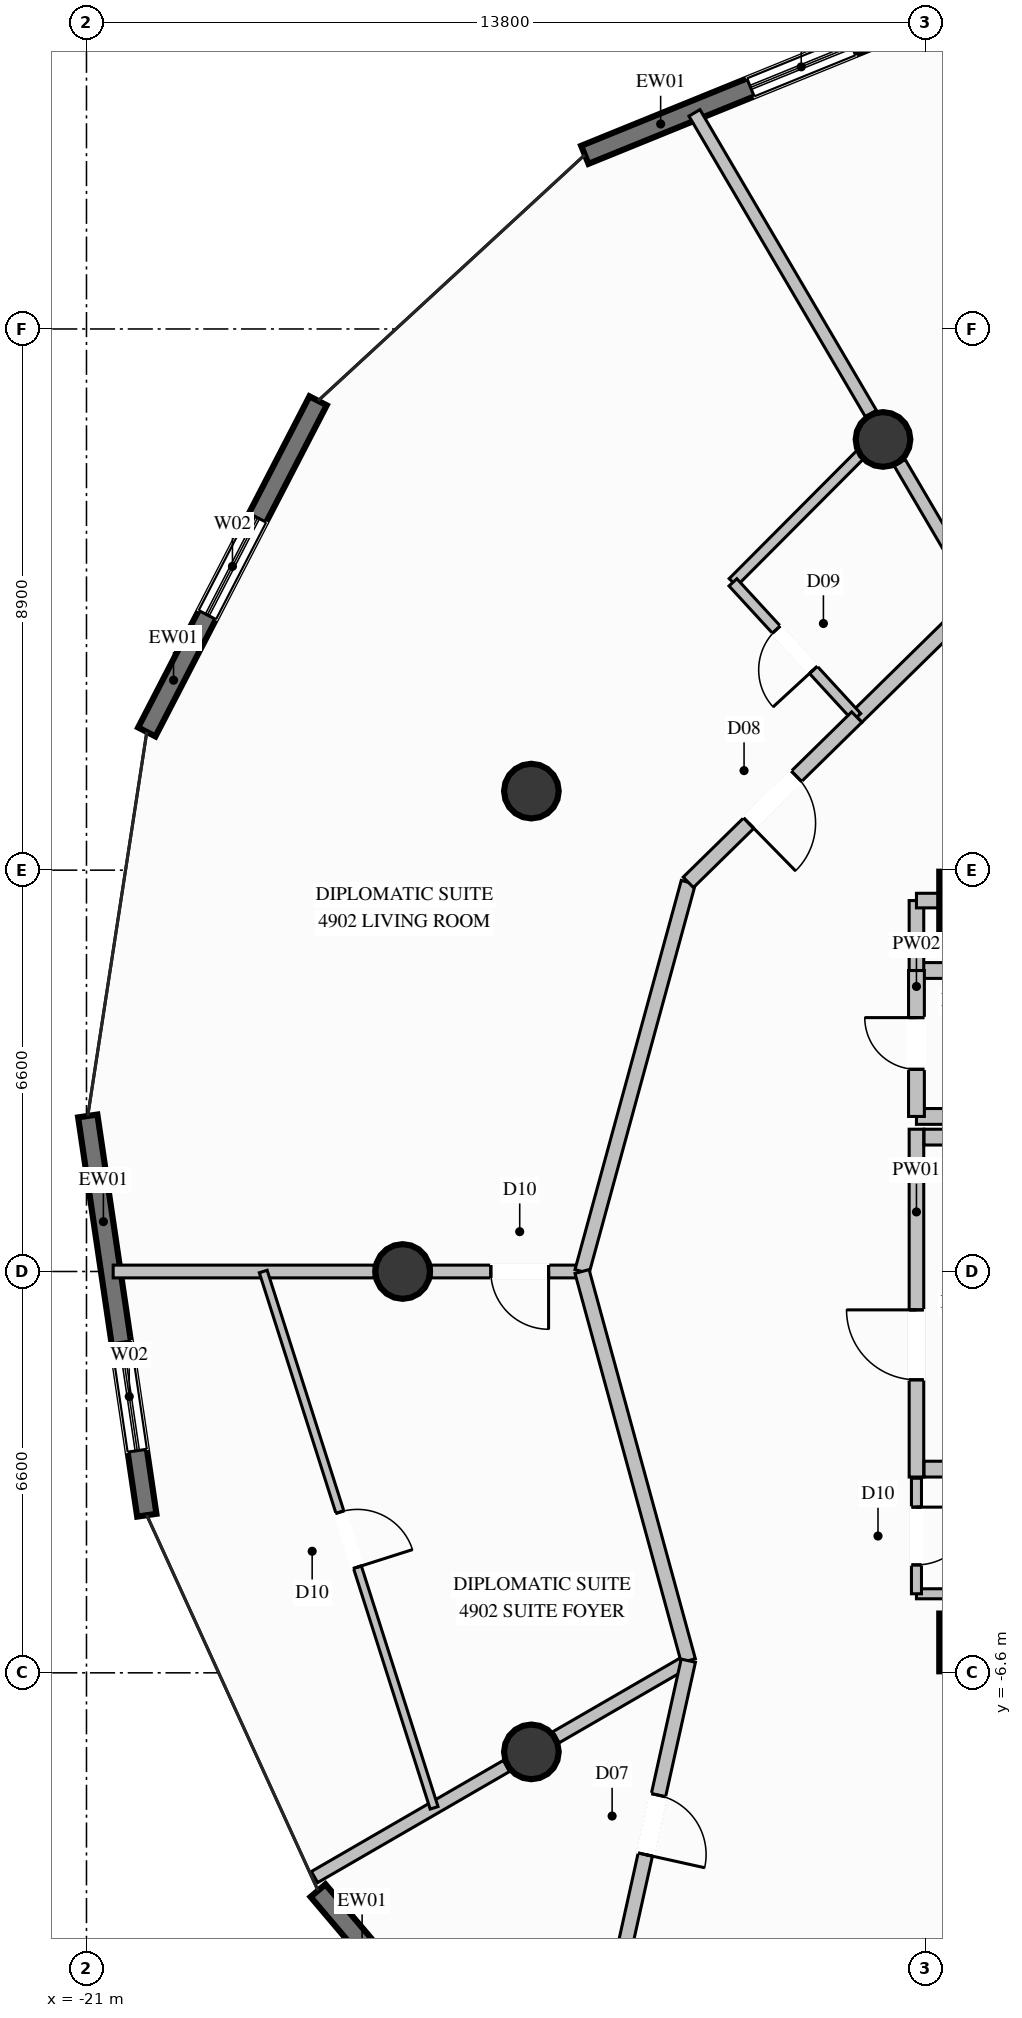
"""IFC4 building model, lengths in metres.
Left out: names, types, materials, properties, quantities, classifications, styles, units other than length and angle.
Written with IfcOpenShell. Run it as: python <this file> out.ifc"""

import sys

from ifc_helpers import new_model, si_unit, direction, frame, frame_2d, origin, origin_2d, place, context, subcontext, project, spatial, rectangle, circle, extrude, element, fill, save


model = new_model("IFC4")
c1 = context("Model", 3, precision=1e-05, world=origin(), true_north=direction((0.0, 1.0)))
c2 = subcontext(c1, "Body", "Model", "MODEL_VIEW")
j1 = project(units=[si_unit("LENGTHUNIT", "METRE"), si_unit("PLANEANGLEUNIT", "RADIAN")], contexts=[c1])
p1 = place(None, origin())
s1 = spatial("IfcSite", under=j1, at=p1, CompositionType="ELEMENT")
p2 = place(p1, origin())
s2 = spatial("IfcBuilding", under=s1, at=p2, CompositionType="ELEMENT")
p3 = place(p2, frame((0.0, 0.0, 184.0)))
s3 = spatial("IfcBuildingStorey", under=s2, at=p3, CompositionType="ELEMENT", Elevation=184.0)
for number, where, z_axis, x_axis in (
    (1, (-6.5, -6.1, 0.0), (0.0, 0.0, 1.0), (1.0, 0.0, 0.0)),
    (2, (-6.5, 6.1, 0.0), (0.0, 0.0, 1.0), (1.0, 0.0, 0.0)),
):
    element("IfcColumn", number, at=place(p3, frame(where, z_axis=z_axis, x_axis=x_axis)), inside=s3, PredefinedType="COLUMN", context=c2, shape_type="SweptSolid", body=[
        extrude(rectangle(XDim=0.95, YDim=0.95, at=origin_2d()), origin(), (0.0, 0.0, 1.0), 3.6),
    ])
for number, where, z_axis, x_axis in (
    (3, (-7.9, 13.683, 0.0), (0.0, 0.0, 1.0), (1.0, 0.0, 0.0)),
    (4, (-13.683, 7.9, 0.0), (0.0, 0.0, 1.0), (1.0, 0.0, 0.0)),
    (5, (-15.8, 0.0, 0.0), (0.0, 0.0, 1.0), (1.0, 0.0, 0.0)),
    (6, (-13.683, -7.9, 0.0), (0.0, 0.0, 1.0), (1.0, 0.0, 0.0)),
):
    element("IfcColumn", number, at=place(p3, frame(where, z_axis=z_axis, x_axis=x_axis)), inside=s3, PredefinedType="COLUMN", context=c2, shape_type="SweptSolid", body=[
        extrude(circle(Radius=0.45, at=origin_2d()), origin(), (0.0, 0.0, 1.0), 3.6),
    ])
p4 = place(p3, frame((-12.804, 18.364, 0.0), z_axis=(0.0, 0.0, 1.0), x_axis=(0.926362198949, 0.376633875745, 0.0)))
e7 = element("IfcWall", 7, at=p4, inside=s3, PredefinedType="SOLIDWALL", context=c2, shape_type="SweptSolid", body=[
    extrude(rectangle(XDim=5.966, YDim=0.32, at=frame_2d((2.983, 0.0))), origin(), (0.0, 0.0, 1.0), 3.36),
])
p5 = place(p4, frame((2.942, 0.0, 0.35)))
e8 = element("IfcOpeningElement", 8, at=p5, cuts=e7, PredefinedType="OPENING", context=c2, shape_type="SweptSolid", body=[
    extrude(rectangle(XDim=1.8, YDim=2.6, at=frame_2d((0.9, 1.3))), frame((0.0, 0.17, 0.0), z_axis=(0.0, -1.0, 0.0), x_axis=(1.0, 0.0, 0.0)), (0.0, 0.0, 1.0), 0.34),
])
p6 = place(p3, frame((-20.008, 8.873, 0.0), z_axis=(0.0, 0.0, 1.0), x_axis=(0.459451082053, 0.888203075428, 0.0)))
e9 = element("IfcWall", 9, at=p6, inside=s3, PredefinedType="SOLIDWALL", context=c2, shape_type="SweptSolid", body=[
    extrude(rectangle(XDim=6.132, YDim=0.32, at=frame_2d((3.066, 0.0))), origin(), (0.0, 0.0, 1.0), 3.36),
])
p7 = place(p6, frame((2.166, 0.0, 0.35)))
e10 = element("IfcOpeningElement", 10, at=p7, cuts=e9, PredefinedType="OPENING", context=c2, shape_type="SweptSolid", body=[
    extrude(rectangle(XDim=1.8, YDim=2.6, at=frame_2d((0.9, 1.3))), frame((0.0, 0.17, 0.0), z_axis=(0.0, -1.0, 0.0), x_axis=(1.0, 0.0, 0.0)), (0.0, 0.0, 1.0), 0.34),
])
p8 = place(p3, frame((-20.008, -4.008, 0.0), z_axis=(0.0, 0.0, 1.0), x_axis=(-0.146280717265, 0.989243120652, 0.0)))
e11 = element("IfcWall", 11, at=p8, inside=s3, PredefinedType="SOLIDWALL", context=c2, shape_type="SweptSolid", body=[
    extrude(rectangle(XDim=6.637, YDim=0.32, at=frame_2d((3.319, 0.0))), origin(), (0.0, 0.0, 1.0), 3.36),
])
p9 = place(p8, frame((1.073, 0.0, 0.35)))
e12 = element("IfcOpeningElement", 12, at=p9, cuts=e11, PredefinedType="OPENING", context=c2, shape_type="SweptSolid", body=[
    extrude(rectangle(XDim=1.8, YDim=2.6, at=frame_2d((0.9, 1.3))), frame((0.0, 0.17, 0.0), z_axis=(0.0, -1.0, 0.0), x_axis=(1.0, 0.0, 0.0)), (0.0, 0.0, 1.0), 0.34),
])
p10 = place(p3, frame((-12.806, -15.357, 0.0), z_axis=(0.0, 0.0, 1.0), x_axis=(-0.646480871515, 0.762930195212, 0.0)))
e13 = element("IfcWall", 13, at=p10, inside=s3, PredefinedType="SOLIDWALL", context=c2, shape_type="SweptSolid", body=[
    extrude(rectangle(XDim=6.784, YDim=0.32, at=frame_2d((3.392, 0.0))), origin(), (0.0, 0.0, 1.0), 3.36),
])
p11 = place(p10, frame((2.492, 0.0, 0.35)))
e14 = element("IfcOpeningElement", 14, at=p11, cuts=e13, PredefinedType="OPENING", context=c2, shape_type="SweptSolid", body=[
    extrude(rectangle(XDim=1.8, YDim=2.6, at=frame_2d((0.9, 1.3))), frame((0.0, 0.17, 0.0), z_axis=(0.0, -1.0, 0.0), x_axis=(1.0, 0.0, 0.0)), (0.0, 0.0, 1.0), 0.34),
])
p12 = place(p3, frame((-7.35, -3.38, 0.0), z_axis=(0.0, 0.0, 1.0), x_axis=(0.0, 1.0, 0.0)))
e15 = element("IfcWall", 15, at=p12, inside=s3, PredefinedType="PARTITIONING", context=c2, shape_type="SweptSolid", body=[
    extrude(rectangle(XDim=5.72, YDim=0.24, at=frame_2d((2.86, 0.0))), origin(), (0.0, 0.0, 1.0), 2.445),
])
p13 = place(p12, frame((1.599, 0.0, 0.0)))
e16 = element("IfcOpeningElement", 16, at=p13, cuts=e15, PredefinedType="OPENING", context=c2, shape_type="SweptSolid", body=[
    extrude(rectangle(XDim=1.15, YDim=2.2, at=frame_2d((0.575, 1.1))), frame((0.0, 0.13, 0.0), z_axis=(0.0, -1.0, 0.0), x_axis=(1.0, 0.0, 0.0)), (0.0, 0.0, 1.0), 0.26),
])
p14 = place(p3, frame((-7.225, -3.25, 0.0), z_axis=(0.0, 0.0, 1.0), x_axis=(1.0, 0.0, 0.0)))
e17 = element("IfcWall", 17, at=p14, inside=s3, PredefinedType="PARTITIONING", context=c2, shape_type="SweptSolid", body=[
    extrude(rectangle(XDim=3.095, YDim=0.26, at=frame_2d((1.548, 0.0))), origin(), (0.0, 0.0, 1.0), 3.36),
])
p15 = place(p3, frame((-7.225, 2.21, 0.0), z_axis=(0.0, 0.0, 1.0), x_axis=(1.0, 0.0, 0.0)))
e18 = element("IfcWall", 18, at=p15, inside=s3, PredefinedType="PARTITIONING", context=c2, shape_type="SweptSolid", body=[
    extrude(rectangle(XDim=0.875, YDim=0.26, at=frame_2d((0.438, 0.0))), origin(), (0.0, 0.0, 1.0), 3.36),
])
for number, where, z_axis, x_axis in (
    (19, (-7.35, 4.95, 0.0), (0.0, 0.0, 1.0), (1.0, 0.0, 0.0)),
    (20, (-7.35, 2.55, 0.0), (0.0, 0.0, 1.0), (1.0, 0.0, 0.0)),
):
    element("IfcWall", number, at=place(p3, frame(where, z_axis=z_axis, x_axis=x_axis)), inside=s3, PredefinedType="PARTITIONING", context=c2, shape_type="SweptSolid", body=[
        extrude(rectangle(XDim=0.93, YDim=0.26, at=frame_2d((0.465, 0.0))), origin(), (0.0, 0.0, 1.0), 3.36),
    ])
p16 = place(p3, frame((-7.35, 2.55, 0.0), z_axis=(0.0, 0.0, 1.0), x_axis=(0.0, 1.0, 0.0)))
e21 = element("IfcWall", 21, at=p16, inside=s3, PredefinedType="PARTITIONING", context=c2, shape_type="SweptSolid", body=[
    extrude(rectangle(XDim=2.4, YDim=0.26, at=frame_2d((1.2, 0.0))), origin(), (0.0, 0.0, 1.0), 2.445),
])
p17 = place(p16, frame((0.775, 0.0, 0.0)))
e22 = element("IfcOpeningElement", 22, at=p17, cuts=e21, PredefinedType="OPENING", context=c2, shape_type="SweptSolid", body=[
    extrude(rectangle(XDim=0.85, YDim=2.05, at=frame_2d((0.425, 1.025))), frame((0.0, 0.14, 0.0), z_axis=(0.0, -1.0, 0.0), x_axis=(1.0, 0.0, 0.0)), (0.0, 0.0, 1.0), 0.28),
])
p18 = place(p3, frame((-7.35, 4.95, 0.0), z_axis=(0.0, 0.0, 1.0), x_axis=(0.0, 1.0, 0.0)))
e23 = element("IfcWall", 23, at=p18, inside=s3, PredefinedType="PARTITIONING", context=c2, shape_type="SweptSolid", body=[
    extrude(rectangle(XDim=1.15, YDim=0.24, at=frame_2d((0.575, 0.0))), origin(), (0.0, 0.0, 1.0), 2.445),
])
p19 = place(p3, frame((-7.35, 6.1, 0.0), z_axis=(0.0, 0.0, 1.0), x_axis=(1.0, 0.0, 0.0)))
e24 = element("IfcWall", 24, at=p19, inside=s3, PredefinedType="PARTITIONING", context=c2, shape_type="SweptSolid", body=[
    extrude(rectangle(XDim=0.85, YDim=0.24, at=frame_2d((0.425, 0.0))), origin(), (0.0, 0.0, 1.0), 2.877),
])
p20 = place(p3, frame((-7.35, -5.3, 0.0), z_axis=(0.0, 0.0, 1.0), x_axis=(1.0, 0.0, 0.0)))
e25 = element("IfcWall", 25, at=p20, inside=s3, PredefinedType="PARTITIONING", context=c2, shape_type="SweptSolid", body=[
    extrude(rectangle(XDim=1.5, YDim=0.165, at=frame_2d((0.75, 0.0))), origin(), (0.0, 0.0, 1.0), 2.445),
])
p21 = place(p3, frame((-7.35, -3.4, 0.0), z_axis=(0.0, 0.0, 1.0), x_axis=(0.0, -1.0, 0.0)))
e26 = element("IfcWall", 26, at=p21, inside=s3, PredefinedType="PARTITIONING", context=c2, shape_type="SweptSolid", body=[
    extrude(rectangle(XDim=1.9, YDim=0.165, at=frame_2d((0.95, 0.0))), origin(), (0.0, 0.0, 1.0), 3.36),
])
p22 = place(p21, frame((0.475, 0.0, 0.0)))
e27 = element("IfcOpeningElement", 27, at=p22, cuts=e26, PredefinedType="OPENING", context=c2, shape_type="SweptSolid", body=[
    extrude(rectangle(XDim=0.95, YDim=2.1, at=frame_2d((0.475, 1.05))), frame((0.0, 0.093, 0.0), z_axis=(0.0, -1.0, 0.0), x_axis=(1.0, 0.0, 0.0)), (0.0, 0.0, 1.0), 0.185),
])
p23 = place(p3, frame((-6.325, 11.085, 0.0), z_axis=(0.0, 0.0, 1.0), x_axis=(-0.506285052897, 0.862366189744, 0.0)))
e28 = element("IfcWall", 28, at=p23, inside=s3, PredefinedType="PARTITIONING", context=c2, shape_type="SweptSolid", body=[
    extrude(rectangle(XDim=2.57, YDim=0.21, at=frame_2d((1.285, 0.0))), origin(), (0.0, 0.0, 1.0), 2.877),
])
p24 = place(p3, frame((-8.099, 14.109, 0.0), z_axis=(0.0, 0.0, 1.0), x_axis=(-0.506111753197, 0.862467908548, 0.0)))
e29 = element("IfcWall", 29, at=p24, inside=s3, PredefinedType="PARTITIONING", context=c2, shape_type="SweptSolid", body=[
    extrude(rectangle(XDim=5.734, YDim=0.21, at=frame_2d((2.867, 0.0))), origin(), (0.0, 0.0, 1.0), 3.36),
])
p25 = place(p3, frame((-12.85, 0.0, 0.0), z_axis=(0.0, 0.0, 1.0), x_axis=(-1.0, 0.0, 0.0)))
e30 = element("IfcWall", 30, at=p25, inside=s3, PredefinedType="PARTITIONING", context=c2, shape_type="SweptSolid", body=[
    extrude(rectangle(XDim=2.48, YDim=0.21, at=frame_2d((1.24, 0.0))), origin(), (0.0, 0.0, 1.0), 3.36),
])
p26 = place(p25, frame((0.55, 0.0, 0.0)))
e31 = element("IfcOpeningElement", 31, at=p26, cuts=e30, PredefinedType="OPENING", context=c2, shape_type="SweptSolid", body=[
    extrude(rectangle(XDim=0.95, YDim=2.1, at=frame_2d((0.475, 1.05))), frame((0.0, 0.115, 0.0), z_axis=(0.0, -1.0, 0.0), x_axis=(1.0, 0.0, 0.0)), (0.0, 0.0, 1.0), 0.23),
])
p27 = place(p3, frame((-16.27, 0.0, 0.0), z_axis=(0.0, 0.0, 1.0), x_axis=(-1.0, 0.0, 0.0)))
e32 = element("IfcWall", 32, at=p27, inside=s3, PredefinedType="PARTITIONING", context=c2, shape_type="SweptSolid", body=[
    extrude(rectangle(XDim=4.291, YDim=0.21, at=frame_2d((2.146, 0.0))), origin(), (0.0, 0.0, 1.0), 3.36),
])
p28 = place(p3, frame((-11.102, -6.4, 0.0), z_axis=(0.0, 0.0, 1.0), x_axis=(-0.8654883009, -0.500929137708, 0.0)))
e33 = element("IfcWall", 33, at=p28, inside=s3, PredefinedType="PARTITIONING", context=c2, shape_type="SweptSolid", body=[
    extrude(rectangle(XDim=2.515, YDim=0.21, at=frame_2d((1.258, 0.0))), origin(), (0.0, 0.0, 1.0), 2.877),
])
p29 = place(p3, frame((-14.092, -8.131, 0.0), z_axis=(0.0, 0.0, 1.0), x_axis=(-0.865475144778, -0.50095186772, 0.0)))
e34 = element("IfcWall", 34, at=p29, inside=s3, PredefinedType="PARTITIONING", context=c2, shape_type="SweptSolid", body=[
    extrude(rectangle(XDim=3.649, YDim=0.21, at=frame_2d((1.824, 0.0))), origin(), (0.0, 0.0, 1.0), 3.36),
])
p30 = place(p3, frame((-6.325, 11.085, 0.0), z_axis=(0.0, 0.0, 1.0), x_axis=(-0.713850549357, -0.700298074524, 0.0)))
e35 = element("IfcWall", 35, at=p30, inside=s3, PredefinedType="PARTITIONING", context=c2, shape_type="SweptSolid", body=[
    extrude(rectangle(XDim=2.81, YDim=0.24, at=frame_2d((1.405, 0.0))), origin(), (0.0, 0.0, 1.0), 3.36),
])
p31 = place(p3, frame((-7.915, 13.794, 0.0), z_axis=(0.0, 0.0, 1.0), x_axis=(-0.70594646808, -0.708265193416, 0.0)))
e36 = element("IfcWall", 36, at=p31, inside=s3, PredefinedType="PLUMBINGWALL", context=c2, shape_type="SweptSolid", body=[
    extrude(rectangle(XDim=3.475, YDim=0.175, at=frame_2d((1.737, 0.0))), origin(), (0.0, 0.0, 1.0), 2.929),
])
p32 = place(p3, frame((-8.331, 9.117, 0.0), z_axis=(0.0, 0.0, 1.0), x_axis=(-0.676712049705, 0.736247785589, 0.0)))
e37 = element("IfcWall", 37, at=p32, inside=s3, PredefinedType="PLUMBINGWALL", context=c2, shape_type="SweptSolid", body=[
    extrude(rectangle(XDim=3.01, YDim=0.175, at=frame_2d((1.505, 0.0))), origin(), (0.0, 0.0, 1.0), 3.36),
])
p33 = place(p32, frame((1.055, 0.0, 0.0)))
e38 = element("IfcOpeningElement", 38, at=p33, cuts=e37, PredefinedType="OPENING", context=c2, shape_type="SweptSolid", body=[
    extrude(rectangle(XDim=0.9, YDim=2.1, at=frame_2d((0.45, 1.05))), frame((0.0, 0.098, 0.0), z_axis=(0.0, -1.0, 0.0), x_axis=(1.0, 0.0, 0.0)), (0.0, 0.0, 1.0), 0.195),
])
p34 = place(p3, frame((-11.102, 6.4, 0.0), z_axis=(0.0, 0.0, 1.0), x_axis=(-0.263484816116, -0.96466354325, 0.0)))
e39 = element("IfcWall", 39, at=p34, inside=s3, PredefinedType="PARTITIONING", context=c2, shape_type="SweptSolid", body=[
    extrude(rectangle(XDim=6.634, YDim=0.24, at=frame_2d((3.317, 0.0))), origin(), (0.0, 0.0, 1.0), 3.36),
])
p35 = place(p3, frame((-8.331, 9.117, 0.0), z_axis=(0.0, 0.0, 1.0), x_axis=(-0.714024122855, -0.700121098084, 0.0)))
e40 = element("IfcWall", 40, at=p35, inside=s3, PredefinedType="PARTITIONING", context=c2, shape_type="SweptSolid", body=[
    extrude(rectangle(XDim=3.881, YDim=0.24, at=frame_2d((1.94, 0.0))), origin(), (0.0, 0.0, 1.0), 3.36),
])
p36 = place(p35, frame((1.39, 0.0, 0.0)))
e41 = element("IfcOpeningElement", 41, at=p36, cuts=e40, PredefinedType="OPENING", context=c2, shape_type="SweptSolid", body=[
    extrude(rectangle(XDim=1.1, YDim=2.3, at=frame_2d((0.55, 1.15))), frame((0.0, 0.13, 0.0), z_axis=(0.0, -1.0, 0.0), x_axis=(1.0, 0.0, 0.0)), (0.0, 0.0, 1.0), 0.26),
])
p37 = place(p3, frame((-12.85, 0.0, 0.0), z_axis=(0.0, 0.0, 1.0), x_axis=(0.263484816116, -0.96466354325, 0.0)))
e42 = element("IfcWall", 42, at=p37, inside=s3, PredefinedType="PARTITIONING", context=c2, shape_type="SweptSolid", body=[
    extrude(rectangle(XDim=6.634, YDim=0.24, at=frame_2d((3.317, 0.0))), origin(), (0.0, 0.0, 1.0), 3.36),
])
p38 = place(p3, frame((-18.093, 0.0, 0.0), z_axis=(0.0, 0.0, 1.0), x_axis=(0.303563963888, -0.952811061979, 0.0)))
e43 = element("IfcWall", 43, at=p38, inside=s3, PredefinedType="PARTITIONING", context=c2, shape_type="SweptSolid", body=[
    extrude(rectangle(XDim=9.257, YDim=0.135, at=frame_2d((4.628, 0.0))), origin(), (0.0, 0.0, 1.0), 3.36),
])
p39 = place(p38, frame((4.153, 0.0, 0.0)))
e44 = element("IfcOpeningElement", 44, at=p39, cuts=e43, PredefinedType="OPENING", context=c2, shape_type="SweptSolid", body=[
    extrude(rectangle(XDim=0.95, YDim=2.1, at=frame_2d((0.475, 1.05))), frame((0.0, 0.078, 0.0), z_axis=(0.0, -1.0, 0.0), x_axis=(1.0, 0.0, 0.0)), (0.0, 0.0, 1.0), 0.155),
])
p40 = place(p3, frame((-11.102, -6.4, 0.0), z_axis=(0.0, 0.0, 1.0), x_axis=(-0.216579944639, -0.976264885971, 0.0)))
e45 = element("IfcWall", 45, at=p40, inside=s3, PredefinedType="PARTITIONING", context=c2, shape_type="SweptSolid", body=[
    extrude(rectangle(XDim=5.531, YDim=0.24, at=frame_2d((2.766, 0.0))), origin(), (0.0, 0.0, 1.0), 3.36),
])
p41 = place(p40, frame((2.266, 0.0, 0.0)))
e46 = element("IfcOpeningElement", 46, at=p41, cuts=e45, PredefinedType="OPENING", context=c2, shape_type="SweptSolid", body=[
    extrude(rectangle(XDim=1.0, YDim=2.2, at=frame_2d((0.5, 1.1))), frame((0.0, 0.13, 0.0), z_axis=(0.0, -1.0, 0.0), x_axis=(1.0, 0.0, 0.0)), (0.0, 0.0, 1.0), 0.26),
])
p42 = place(p5, origin())
e47 = element("IfcWindow", 47, at=p42, inside=s3, PartitioningType="SINGLE_PANEL", PredefinedType="WINDOW", context=c2, shape_type="SweptSolid", body=[
    extrude(rectangle(XDim=1.8, YDim=2.6, at=frame_2d((0.9, 1.3))), frame((0.0, 0.03, 0.0), z_axis=(0.0, -1.0, 0.0), x_axis=(1.0, 0.0, 0.0)), (0.0, 0.0, 1.0), 0.06),
])
fill(e8, e47)
p43 = place(p7, origin())
e48 = element("IfcWindow", 48, at=p43, inside=s3, PartitioningType="SINGLE_PANEL", PredefinedType="WINDOW", context=c2, shape_type="SweptSolid", body=[
    extrude(rectangle(XDim=1.8, YDim=2.6, at=frame_2d((0.9, 1.3))), frame((0.0, 0.03, 0.0), z_axis=(0.0, -1.0, 0.0), x_axis=(1.0, 0.0, 0.0)), (0.0, 0.0, 1.0), 0.06),
])
fill(e10, e48)
p44 = place(p9, origin())
e49 = element("IfcWindow", 49, at=p44, inside=s3, PartitioningType="SINGLE_PANEL", PredefinedType="WINDOW", context=c2, shape_type="SweptSolid", body=[
    extrude(rectangle(XDim=1.8, YDim=2.6, at=frame_2d((0.9, 1.3))), frame((0.0, 0.03, 0.0), z_axis=(0.0, -1.0, 0.0), x_axis=(1.0, 0.0, 0.0)), (0.0, 0.0, 1.0), 0.06),
])
fill(e12, e49)
p45 = place(p13, origin())
e50 = element("IfcDoor", 50, at=p45, inside=s3, OperationType="SINGLE_SWING_RIGHT", PredefinedType="DOOR", context=c2, shape_type="SweptSolid", body=[
    extrude(rectangle(XDim=1.15, YDim=2.2, at=frame_2d((0.575, 1.1))), frame((0.0, 0.025, 0.0), z_axis=(0.0, -1.0, 0.0), x_axis=(1.0, 0.0, 0.0)), (0.0, 0.0, 1.0), 0.05),
])
fill(e16, e50)
p46 = place(p17, origin())
e51 = element("IfcDoor", 51, at=p46, inside=s3, OperationType="SINGLE_SWING_RIGHT", PredefinedType="DOOR", context=c2, shape_type="SweptSolid", body=[
    extrude(rectangle(XDim=0.85, YDim=2.05, at=frame_2d((0.425, 1.025))), frame((0.0, 0.025, 0.0), z_axis=(0.0, -1.0, 0.0), x_axis=(1.0, 0.0, 0.0)), (0.0, 0.0, 1.0), 0.05),
])
fill(e22, e51)
p47 = place(p22, origin())
e52 = element("IfcDoor", 52, at=p47, inside=s3, OperationType="SINGLE_SWING_LEFT", PredefinedType="DOOR", context=c2, shape_type="SweptSolid", body=[
    extrude(rectangle(XDim=0.95, YDim=2.1, at=frame_2d((0.475, 1.05))), frame((0.0, 0.025, 0.0), z_axis=(0.0, -1.0, 0.0), x_axis=(1.0, 0.0, 0.0)), (0.0, 0.0, 1.0), 0.05),
])
fill(e27, e52)
p48 = place(p33, origin())
e53 = element("IfcDoor", 53, at=p48, inside=s3, OperationType="SINGLE_SWING_LEFT", PredefinedType="DOOR", context=c2, shape_type="SweptSolid", body=[
    extrude(rectangle(XDim=0.9, YDim=2.1, at=frame_2d((0.45, 1.05))), frame((0.0, 0.025, 0.0), z_axis=(0.0, -1.0, 0.0), x_axis=(1.0, 0.0, 0.0)), (0.0, 0.0, 1.0), 0.05),
])
fill(e38, e53)
p49 = place(p36, origin())
e54 = element("IfcDoor", 54, at=p49, inside=s3, OperationType="SINGLE_SWING_RIGHT", PredefinedType="DOOR", context=c2, shape_type="SweptSolid", body=[
    extrude(rectangle(XDim=1.1, YDim=2.3, at=frame_2d((0.55, 1.15))), frame((0.0, 0.025, 0.0), z_axis=(0.0, -1.0, 0.0), x_axis=(1.0, 0.0, 0.0)), (0.0, 0.0, 1.0), 0.05),
])
fill(e41, e54)
p50 = place(p26, origin())
e55 = element("IfcDoor", 55, at=p50, inside=s3, OperationType="SINGLE_SWING_LEFT", PredefinedType="DOOR", context=c2, shape_type="SweptSolid", body=[
    extrude(rectangle(XDim=0.95, YDim=2.1, at=frame_2d((0.475, 1.05))), frame((0.0, 0.025, 0.0), z_axis=(0.0, -1.0, 0.0), x_axis=(1.0, 0.0, 0.0)), (0.0, 0.0, 1.0), 0.05),
])
fill(e31, e55)
p51 = place(p39, origin())
e56 = element("IfcDoor", 56, at=p51, inside=s3, OperationType="SINGLE_SWING_RIGHT", PredefinedType="DOOR", context=c2, shape_type="SweptSolid", body=[
    extrude(rectangle(XDim=0.95, YDim=2.1, at=frame_2d((0.475, 1.05))), frame((0.0, 0.025, 0.0), z_axis=(0.0, -1.0, 0.0), x_axis=(1.0, 0.0, 0.0)), (0.0, 0.0, 1.0), 0.05),
])
fill(e44, e56)
p52 = place(p41, origin())
e57 = element("IfcDoor", 57, at=p52, inside=s3, OperationType="SINGLE_SWING_RIGHT", PredefinedType="DOOR", context=c2, shape_type="SweptSolid", body=[
    extrude(rectangle(XDim=1.0, YDim=2.2, at=frame_2d((0.5, 1.1))), frame((0.0, 0.025, 0.0), z_axis=(0.0, -1.0, 0.0), x_axis=(1.0, 0.0, 0.0)), (0.0, 0.0, 1.0), 0.05),
])
fill(e46, e57)
save(model, sys.argv[1])
